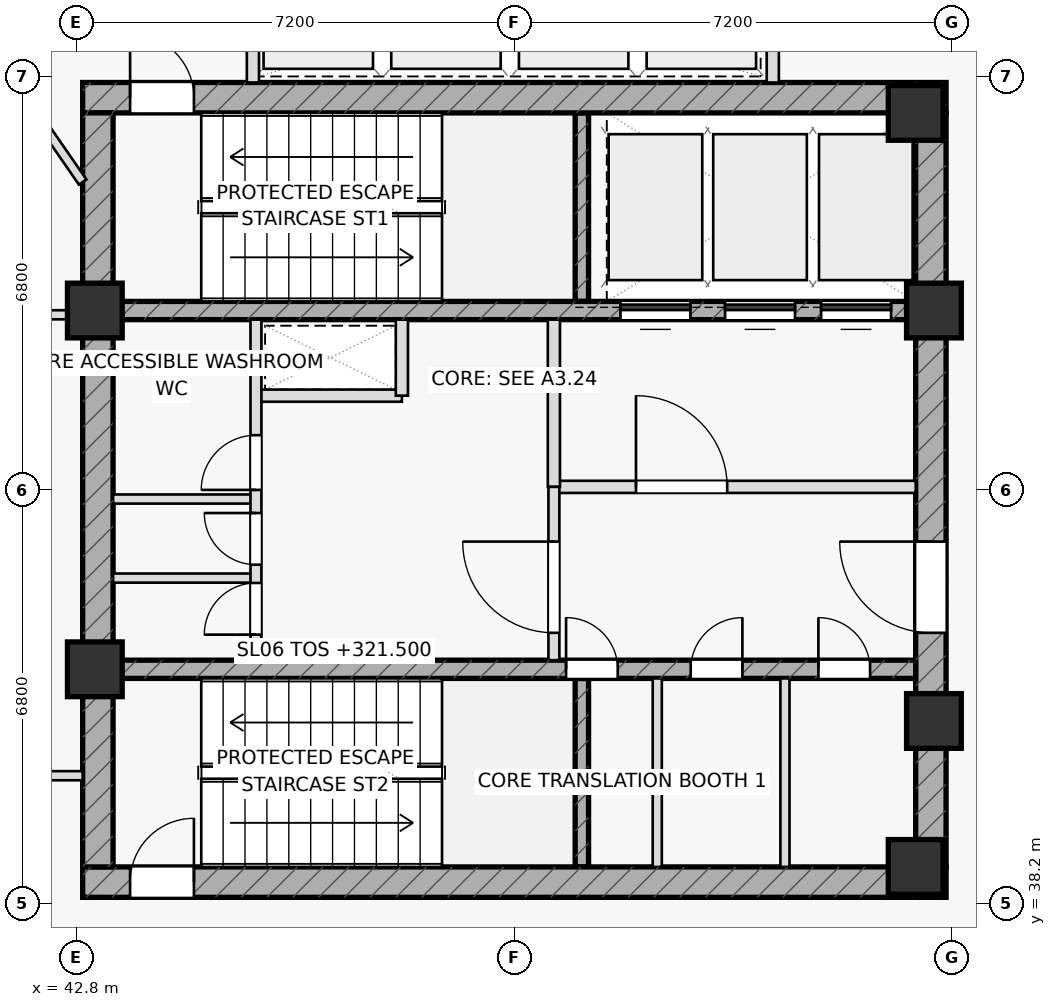
"""IFC4 building model, lengths in metres.
Left out: names, types, materials, properties, quantities, classifications, styles, units other than length and angle.
Written with IfcOpenShell. Run it as: python <this file> out.ifc"""

import sys

from ifc_helpers import new_model, si_unit, direction, frame, frame_2d, origin, origin_2d, place, context, subcontext, project, spatial, rectangle, extrude, element, fill, save


model = new_model("IFC4")
c1 = context("Model", 3, precision=1e-05, world=origin(), true_north=direction((0.0, 1.0)))
c2 = subcontext(c1, "Body", "Model", "MODEL_VIEW")
j1 = project(units=[si_unit("LENGTHUNIT", "METRE"), si_unit("PLANEANGLEUNIT", "RADIAN")], contexts=[c1])
p1 = place(None, origin())
s1 = spatial("IfcSite", under=j1, at=p1, CompositionType="ELEMENT")
p2 = place(p1, origin())
s2 = spatial("IfcBuilding", under=s1, at=p2, CompositionType="ELEMENT")
p3 = place(p2, frame((0.0, 0.0, 321.5)))
s3 = spatial("IfcBuildingStorey", under=s2, at=p3, CompositionType="ELEMENT", Elevation=321.5)
for number, where, z_axis, x_axis in (
    (1, (51.11, 48.1, 0.0), (0.0, 0.0, 1.0), (0.0, 1.0, 0.0)),
    (2, (51.11, 38.8, 0.0), (0.0, 0.0, 1.0), (0.0, 1.0, 0.0)),
):
    element("IfcWall", number, at=place(p3, frame(where, z_axis=z_axis, x_axis=x_axis)), inside=s3, PredefinedType="SHEAR", context=c2, shape_type="SweptSolid", body=[
        extrude(rectangle(XDim=3.1, YDim=0.22, at=frame_2d((1.55, 0.0))), origin(), (0.0, 0.0, 1.0), 3.55),
    ])
p4 = place(p3, frame((42.9, 51.45, 0.0), z_axis=(0.0, 0.0, 1.0), x_axis=(1.0, 0.0, 0.0)))
e3 = element("IfcWall", 3, at=p4, inside=s3, PredefinedType="SHEAR", context=c2, shape_type="SweptSolid", body=[
    extrude(rectangle(XDim=14.2, YDim=0.5, at=frame_2d((7.1, 0.0))), origin(), (0.0, 0.0, 1.0), 3.55),
])
p5 = place(p4, frame((0.78, 0.0, 0.0)))
e4 = element("IfcOpeningElement", 4, at=p5, cuts=e3, PredefinedType="OPENING", context=c2, shape_type="SweptSolid", body=[
    extrude(rectangle(XDim=1.05, YDim=2.2, at=frame_2d((0.525, 1.1))), frame((0.0, 0.26, 0.0), z_axis=(0.0, -1.0, 0.0), x_axis=(1.0, 0.0, 0.0)), (0.0, 0.0, 1.0), 0.52),
])
p6 = place(p3, frame((42.9, 38.55, 0.0), z_axis=(0.0, 0.0, 1.0), x_axis=(1.0, 0.0, 0.0)))
e5 = element("IfcWall", 5, at=p6, inside=s3, PredefinedType="SHEAR", context=c2, shape_type="SweptSolid", body=[
    extrude(rectangle(XDim=14.2, YDim=0.5, at=frame_2d((7.1, 0.0))), origin(), (0.0, 0.0, 1.0), 3.55),
])
p7 = place(p6, frame((0.78, 0.0, 0.0)))
e6 = element("IfcOpeningElement", 6, at=p7, cuts=e5, PredefinedType="OPENING", context=c2, shape_type="SweptSolid", body=[
    extrude(rectangle(XDim=1.05, YDim=2.2, at=frame_2d((0.525, 1.1))), frame((0.0, 0.26, 0.0), z_axis=(0.0, -1.0, 0.0), x_axis=(1.0, 0.0, 0.0)), (0.0, 0.0, 1.0), 0.52),
])
p8 = place(p3, frame((43.15, 38.8, 0.0), z_axis=(0.0, 0.0, 1.0), x_axis=(0.0, 1.0, 0.0)))
e7 = element("IfcWall", 7, at=p8, inside=s3, PredefinedType="SHEAR", context=c2, shape_type="SweptSolid", body=[
    extrude(rectangle(XDim=12.4, YDim=0.5, at=frame_2d((6.2, 0.0))), origin(), (0.0, 0.0, 1.0), 3.55),
])
p9 = place(p3, frame((56.85, 38.8, 0.0), z_axis=(0.0, 0.0, 1.0), x_axis=(0.0, 1.0, 0.0)))
e8 = element("IfcWall", 8, at=p9, inside=s3, PredefinedType="SHEAR", context=c2, shape_type="SweptSolid", body=[
    extrude(rectangle(XDim=12.4, YDim=0.5, at=frame_2d((6.2, 0.0))), origin(), (0.0, 0.0, 1.0), 3.55),
])
p10 = place(p9, frame((3.85, 0.0, 0.0)))
e9 = element("IfcOpeningElement", 9, at=p10, cuts=e8, PredefinedType="OPENING", context=c2, shape_type="SweptSolid", body=[
    extrude(rectangle(XDim=1.5, YDim=2.2, at=frame_2d((0.75, 1.1))), frame((0.0, 0.26, 0.0), z_axis=(0.0, -1.0, 0.0), x_axis=(1.0, 0.0, 0.0)), (0.0, 0.0, 1.0), 0.52),
])
p11 = place(p3, frame((43.4, 47.95, 0.0), z_axis=(0.0, 0.0, 1.0), x_axis=(1.0, 0.0, 0.0)))
e10 = element("IfcWall", 10, at=p11, inside=s3, PredefinedType="SHEAR", context=c2, shape_type="SweptSolid", body=[
    extrude(rectangle(XDim=13.2, YDim=0.3, at=frame_2d((6.6, 0.0))), origin(), (0.0, 0.0, 1.0), 3.55),
])
p12 = place(p11, frame((8.345, 0.0, 0.0)))
e11 = element("IfcOpeningElement", 11, at=p12, cuts=e10, PredefinedType="OPENING", context=c2, shape_type="SweptSolid", body=[
    extrude(rectangle(XDim=1.15, YDim=2.2, at=frame_2d((0.575, 1.1))), frame((0.0, 0.16, 0.0), z_axis=(0.0, -1.0, 0.0), x_axis=(1.0, 0.0, 0.0)), (0.0, 0.0, 1.0), 0.32),
])
p13 = place(p11, frame((10.065, 0.0, 0.0)))
e12 = element("IfcOpeningElement", 12, at=p13, cuts=e10, PredefinedType="OPENING", context=c2, shape_type="SweptSolid", body=[
    extrude(rectangle(XDim=1.15, YDim=2.2, at=frame_2d((0.575, 1.1))), frame((0.0, 0.16, 0.0), z_axis=(0.0, -1.0, 0.0), x_axis=(1.0, 0.0, 0.0)), (0.0, 0.0, 1.0), 0.32),
])
p14 = place(p11, frame((11.645, 0.0, 0.0)))
e13 = element("IfcOpeningElement", 13, at=p14, cuts=e10, PredefinedType="OPENING", context=c2, shape_type="SweptSolid", body=[
    extrude(rectangle(XDim=1.15, YDim=2.2, at=frame_2d((0.575, 1.1))), frame((0.0, 0.16, 0.0), z_axis=(0.0, -1.0, 0.0), x_axis=(1.0, 0.0, 0.0)), (0.0, 0.0, 1.0), 0.32),
])
p15 = place(p3, frame((43.4, 42.05, 0.0), z_axis=(0.0, 0.0, 1.0), x_axis=(1.0, 0.0, 0.0)))
e14 = element("IfcWall", 14, at=p15, inside=s3, PredefinedType="SHEAR", context=c2, shape_type="SweptSolid", body=[
    extrude(rectangle(XDim=13.2, YDim=0.3, at=frame_2d((6.6, 0.0))), origin(), (0.0, 0.0, 1.0), 3.55),
])
p16 = place(p15, frame((7.45, 0.0, 0.0)))
e15 = element("IfcOpeningElement", 15, at=p16, cuts=e14, PredefinedType="OPENING", context=c2, shape_type="SweptSolid", body=[
    extrude(rectangle(XDim=0.85, YDim=2.05, at=frame_2d((0.425, 1.025))), frame((0.0, 0.16, 0.0), z_axis=(0.0, -1.0, 0.0), x_axis=(1.0, 0.0, 0.0)), (0.0, 0.0, 1.0), 0.32),
])
p17 = place(p15, frame((9.5, 0.0, 0.0)))
e16 = element("IfcOpeningElement", 16, at=p17, cuts=e14, PredefinedType="OPENING", context=c2, shape_type="SweptSolid", body=[
    extrude(rectangle(XDim=0.85, YDim=2.05, at=frame_2d((0.425, 1.025))), frame((0.0, 0.16, 0.0), z_axis=(0.0, -1.0, 0.0), x_axis=(1.0, 0.0, 0.0)), (0.0, 0.0, 1.0), 0.32),
])
p18 = place(p15, frame((11.6, 0.0, 0.0)))
e17 = element("IfcOpeningElement", 17, at=p18, cuts=e14, PredefinedType="OPENING", context=c2, shape_type="SweptSolid", body=[
    extrude(rectangle(XDim=0.85, YDim=2.05, at=frame_2d((0.425, 1.025))), frame((0.0, 0.16, 0.0), z_axis=(0.0, -1.0, 0.0), x_axis=(1.0, 0.0, 0.0)), (0.0, 0.0, 1.0), 0.32),
])
for number, where, z_axis, x_axis in (
    (18, (43.1, 47.95, 0.0), (0.0, 0.0, 1.0), (1.0, 0.0, 0.0)),
    (19, (56.9, 47.95, 0.0), (0.0, 0.0, 1.0), (1.0, 0.0, 0.0)),
    (20, (56.6, 51.2, 0.0), (0.0, 0.0, 1.0), (1.0, 0.0, 0.0)),
    (21, (43.1, 42.05, 0.0), (0.0, 0.0, 1.0), (1.0, 0.0, 0.0)),
    (22, (56.9, 41.2, 0.0), (0.0, 0.0, 1.0), (1.0, 0.0, 0.0)),
    (23, (56.6, 38.8, 0.0), (0.0, 0.0, 1.0), (1.0, 0.0, 0.0)),
):
    element("IfcColumn", number, at=place(p3, frame(where, z_axis=z_axis, x_axis=x_axis)), inside=s3, PredefinedType="COLUMN", context=c2, shape_type="SweptSolid", body=[
        extrude(rectangle(XDim=0.9, YDim=0.9, at=origin_2d()), origin(), (0.0, 0.0, 1.0), 3.55),
    ])
for number, where, z_axis, x_axis in (
    (24, (45.7, 51.7, 0.0), (0.0, 0.0, 1.0), (0.0, 1.0, 0.0)),
    (25, (54.25, 51.7, 0.0), (0.0, 0.0, 1.0), (0.0, 1.0, 0.0)),
):
    element("IfcWall", number, at=place(p3, frame(where, z_axis=z_axis, x_axis=x_axis)), inside=s3, PredefinedType="PARTITIONING", context=c2, shape_type="SweptSolid", body=[
        extrude(rectangle(XDim=2.6, YDim=0.2, at=frame_2d((1.3, 0.0))), origin(), (0.0, 0.0, 1.0), 3.55),
    ])
p19 = place(p3, frame((45.75, 46.55, 0.0), z_axis=(0.0, 0.0, 1.0), x_axis=(1.0, 0.0, 0.0)))
e26 = element("IfcWall", 26, at=p19, inside=s3, PredefinedType="PARTITIONING", context=c2, shape_type="SweptSolid", body=[
    extrude(rectangle(XDim=2.4, YDim=0.2, at=frame_2d((1.2, 0.0))), origin(), (0.0, 0.0, 1.0), 3.55),
])
p20 = place(p3, frame((48.15, 46.55, 0.0), z_axis=(0.0, 0.0, 1.0), x_axis=(0.0, 1.0, 0.0)))
e27 = element("IfcWall", 27, at=p20, inside=s3, PredefinedType="PARTITIONING", context=c2, shape_type="SweptSolid", body=[
    extrude(rectangle(XDim=1.25, YDim=0.2, at=frame_2d((0.625, 0.0))), origin(), (0.0, 0.0, 1.0), 3.55),
])
p21 = place(p3, frame((50.65, 45.05, 0.0), z_axis=(0.0, 0.0, 1.0), x_axis=(1.0, 0.0, 0.0)))
e28 = element("IfcWall", 28, at=p21, inside=s3, PredefinedType="PARTITIONING", context=c2, shape_type="SweptSolid", body=[
    extrude(rectangle(XDim=5.95, YDim=0.2, at=frame_2d((2.975, 0.0))), origin(), (0.0, 0.0, 1.0), 3.55),
])
p22 = place(p21, frame((1.35, 0.0, 0.0)))
e29 = element("IfcOpeningElement", 29, at=p22, cuts=e28, PredefinedType="OPENING", context=c2, shape_type="SweptSolid", body=[
    extrude(rectangle(XDim=1.5, YDim=2.2, at=frame_2d((0.75, 1.1))), frame((0.0, 0.11, 0.0), z_axis=(0.0, -1.0, 0.0), x_axis=(1.0, 0.0, 0.0)), (0.0, 0.0, 1.0), 0.22),
])
p23 = place(p3, frame((50.65, 45.05, 0.0), z_axis=(0.0, 0.0, 1.0), x_axis=(0.0, 1.0, 0.0)))
e30 = element("IfcWall", 30, at=p23, inside=s3, PredefinedType="PARTITIONING", context=c2, shape_type="SweptSolid", body=[
    extrude(rectangle(XDim=2.75, YDim=0.2, at=frame_2d((1.375, 0.0))), origin(), (0.0, 0.0, 1.0), 3.55),
])
p24 = place(p3, frame((50.65, 42.2, 0.0), z_axis=(0.0, 0.0, 1.0), x_axis=(0.0, 1.0, 0.0)))
e31 = element("IfcWall", 31, at=p24, inside=s3, PredefinedType="PARTITIONING", context=c2, shape_type="SweptSolid", body=[
    extrude(rectangle(XDim=2.85, YDim=0.18, at=frame_2d((1.425, 0.0))), origin(), (0.0, 0.0, 1.0), 3.55),
])
p25 = place(p24, frame((0.45, 0.0, 0.0)))
e32 = element("IfcOpeningElement", 32, at=p25, cuts=e31, PredefinedType="OPENING", context=c2, shape_type="SweptSolid", body=[
    extrude(rectangle(XDim=1.5, YDim=2.2, at=frame_2d((0.75, 1.1))), frame((0.0, 0.1, 0.0), z_axis=(0.0, -1.0, 0.0), x_axis=(1.0, 0.0, 0.0)), (0.0, 0.0, 1.0), 0.2),
])
for number, where, z_axis, x_axis in (
    (33, (52.35, 38.8, 0.0), (0.0, 0.0, 1.0), (0.0, 1.0, 0.0)),
    (34, (54.45, 38.8, 0.0), (0.0, 0.0, 1.0), (0.0, 1.0, 0.0)),
):
    element("IfcWall", number, at=place(p3, frame(where, z_axis=z_axis, x_axis=x_axis)), inside=s3, PredefinedType="PARTITIONING", context=c2, shape_type="SweptSolid", body=[
        extrude(rectangle(XDim=3.1, YDim=0.15, at=frame_2d((1.55, 0.0))), origin(), (0.0, 0.0, 1.0), 3.55),
    ])
for number, where, z_axis, x_axis in (
    (35, (43.4, 43.55, 0.0), (0.0, 0.0, 1.0), (1.0, 0.0, 0.0)),
    (36, (43.4, 44.85, 0.0), (0.0, 0.0, 1.0), (1.0, 0.0, 0.0)),
):
    element("IfcWall", number, at=place(p3, frame(where, z_axis=z_axis, x_axis=x_axis)), inside=s3, PredefinedType="PARTITIONING", context=c2, shape_type="SweptSolid", body=[
        extrude(rectangle(XDim=2.35, YDim=0.15, at=frame_2d((1.175, 0.0))), origin(), (0.0, 0.0, 1.0), 3.55),
    ])
p26 = place(p3, frame((45.75, 42.2, 0.0), z_axis=(0.0, 0.0, 1.0), x_axis=(0.0, 1.0, 0.0)))
e37 = element("IfcWall", 37, at=p26, inside=s3, PredefinedType="PARTITIONING", context=c2, shape_type="SweptSolid", body=[
    extrude(rectangle(XDim=5.6, YDim=0.18, at=frame_2d((2.8, 0.0))), origin(), (0.0, 0.0, 1.0), 3.55),
])
p27 = place(p26, frame((0.42, 0.0, 0.0)))
e38 = element("IfcOpeningElement", 38, at=p27, cuts=e37, PredefinedType="OPENING", context=c2, shape_type="SweptSolid", body=[
    extrude(rectangle(XDim=0.85, YDim=2.05, at=frame_2d((0.425, 1.025))), frame((0.0, 0.1, 0.0), z_axis=(0.0, -1.0, 0.0), x_axis=(1.0, 0.0, 0.0)), (0.0, 0.0, 1.0), 0.2),
])
p28 = place(p26, frame((1.57, 0.0, 0.0)))
e39 = element("IfcOpeningElement", 39, at=p28, cuts=e37, PredefinedType="OPENING", context=c2, shape_type="SweptSolid", body=[
    extrude(rectangle(XDim=0.85, YDim=2.05, at=frame_2d((0.425, 1.025))), frame((0.0, 0.1, 0.0), z_axis=(0.0, -1.0, 0.0), x_axis=(1.0, 0.0, 0.0)), (0.0, 0.0, 1.0), 0.2),
])
p29 = place(p26, frame((2.8, 0.0, 0.0)))
e40 = element("IfcOpeningElement", 40, at=p29, cuts=e37, PredefinedType="OPENING", context=c2, shape_type="SweptSolid", body=[
    extrude(rectangle(XDim=0.9, YDim=2.05, at=frame_2d((0.45, 1.025))), frame((0.0, 0.1, 0.0), z_axis=(0.0, -1.0, 0.0), x_axis=(1.0, 0.0, 0.0)), (0.0, 0.0, 1.0), 0.2),
])
p30 = place(p3, frame((37.14, 40.3, 0.0), z_axis=(0.0, 0.0, 1.0), x_axis=(1.0, 0.0, 0.0)))
e41 = element("IfcWall", 41, at=p30, inside=s3, PredefinedType="PARTITIONING", context=c2, shape_type="SweptSolid", body=[
    extrude(rectangle(XDim=5.76, YDim=0.15, at=frame_2d((2.88, 0.0))), origin(), (0.0, 0.0, 1.0), 3.075),
])
p31 = place(p30, frame((3.21, 0.0, 0.0)))
e42 = element("IfcOpeningElement", 42, at=p31, cuts=e41, PredefinedType="OPENING", context=c2, shape_type="SweptSolid", body=[
    extrude(rectangle(XDim=0.95, YDim=2.05, at=frame_2d((0.475, 1.025))), frame((0.0, 0.085, 0.0), z_axis=(0.0, -1.0, 0.0), x_axis=(1.0, 0.0, 0.0)), (0.0, 0.0, 1.0), 0.17),
])
p32 = place(p3, frame((37.14, 47.88, 0.0), z_axis=(0.0, 0.0, 1.0), x_axis=(1.0, 0.0, 0.0)))
e43 = element("IfcWall", 43, at=p32, inside=s3, PredefinedType="PARTITIONING", context=c2, shape_type="SweptSolid", body=[
    extrude(rectangle(XDim=5.76, YDim=0.15, at=frame_2d((2.88, 0.0))), origin(), (0.0, 0.0, 1.0), 3.55),
])
p33 = place(p3, frame((42.9, 50.062, 0.0), z_axis=(0.0, 0.0, 1.0), x_axis=(-0.568663071572, 0.822570550792, 0.0)))
e44 = element("IfcWall", 44, at=p33, inside=s3, PredefinedType="PARTITIONING", context=c2, shape_type="SweptSolid", body=[
    extrude(rectangle(XDim=14.047, YDim=0.15, at=frame_2d((7.023, 0.0))), origin(), (0.0, 0.0, 1.0), 3.075),
])
p34 = place(p33, frame((1.35, 0.0, 0.0)))
e45 = element("IfcOpeningElement", 45, at=p34, cuts=e44, PredefinedType="OPENING", context=c2, shape_type="SweptSolid", body=[
    extrude(rectangle(XDim=0.95, YDim=2.05, at=frame_2d((0.475, 1.025))), frame((0.0, 0.085, 0.0), z_axis=(0.0, -1.0, 0.0), x_axis=(1.0, 0.0, 0.0)), (0.0, 0.0, 1.0), 0.17),
])
p35 = place(p5, origin())
e46 = element("IfcDoor", 46, at=p35, inside=s3, OperationType="SINGLE_SWING_LEFT", PredefinedType="DOOR", context=c2, shape_type="SweptSolid", body=[
    extrude(rectangle(XDim=1.05, YDim=2.2, at=frame_2d((0.525, 1.1))), frame((0.0, 0.025, 0.0), z_axis=(0.0, -1.0, 0.0), x_axis=(1.0, 0.0, 0.0)), (0.0, 0.0, 1.0), 0.05),
])
fill(e4, e46)
p36 = place(p7, origin())
e47 = element("IfcDoor", 47, at=p36, inside=s3, OperationType="SINGLE_SWING_RIGHT", PredefinedType="DOOR", context=c2, shape_type="SweptSolid", body=[
    extrude(rectangle(XDim=1.05, YDim=2.2, at=frame_2d((0.525, 1.1))), frame((0.0, 0.025, 0.0), z_axis=(0.0, -1.0, 0.0), x_axis=(1.0, 0.0, 0.0)), (0.0, 0.0, 1.0), 0.05),
])
fill(e6, e47)
p37 = place(p10, origin())
e48 = element("IfcDoor", 48, at=p37, inside=s3, OperationType="SINGLE_SWING_RIGHT", PredefinedType="DOOR", context=c2, shape_type="SweptSolid", body=[
    extrude(rectangle(XDim=1.5, YDim=2.2, at=frame_2d((0.75, 1.1))), frame((0.0, 0.025, 0.0), z_axis=(0.0, -1.0, 0.0), x_axis=(1.0, 0.0, 0.0)), (0.0, 0.0, 1.0), 0.05),
])
fill(e9, e48)
p38 = place(p22, origin())
e49 = element("IfcDoor", 49, at=p38, inside=s3, OperationType="SINGLE_SWING_LEFT", PredefinedType="DOOR", context=c2, shape_type="SweptSolid", body=[
    extrude(rectangle(XDim=1.5, YDim=2.2, at=frame_2d((0.75, 1.1))), frame((0.0, 0.025, 0.0), z_axis=(0.0, -1.0, 0.0), x_axis=(1.0, 0.0, 0.0)), (0.0, 0.0, 1.0), 0.05),
])
fill(e29, e49)
p39 = place(p25, origin())
e50 = element("IfcDoor", 50, at=p39, inside=s3, OperationType="SINGLE_SWING_RIGHT", PredefinedType="DOOR", context=c2, shape_type="SweptSolid", body=[
    extrude(rectangle(XDim=1.5, YDim=2.2, at=frame_2d((0.75, 1.1))), frame((0.0, 0.025, 0.0), z_axis=(0.0, -1.0, 0.0), x_axis=(1.0, 0.0, 0.0)), (0.0, 0.0, 1.0), 0.05),
])
fill(e32, e50)
p40 = place(p16, origin())
e51 = element("IfcDoor", 51, at=p40, inside=s3, OperationType="SINGLE_SWING_LEFT", PredefinedType="DOOR", context=c2, shape_type="SweptSolid", body=[
    extrude(rectangle(XDim=0.85, YDim=2.05, at=frame_2d((0.425, 1.025))), frame((0.0, 0.025, 0.0), z_axis=(0.0, -1.0, 0.0), x_axis=(1.0, 0.0, 0.0)), (0.0, 0.0, 1.0), 0.05),
])
fill(e15, e51)
p41 = place(p17, origin())
e52 = element("IfcDoor", 52, at=p41, inside=s3, OperationType="SINGLE_SWING_RIGHT", PredefinedType="DOOR", context=c2, shape_type="SweptSolid", body=[
    extrude(rectangle(XDim=0.85, YDim=2.05, at=frame_2d((0.425, 1.025))), frame((0.0, 0.025, 0.0), z_axis=(0.0, -1.0, 0.0), x_axis=(1.0, 0.0, 0.0)), (0.0, 0.0, 1.0), 0.05),
])
fill(e16, e52)
p42 = place(p18, origin())
e53 = element("IfcDoor", 53, at=p42, inside=s3, OperationType="SINGLE_SWING_LEFT", PredefinedType="DOOR", context=c2, shape_type="SweptSolid", body=[
    extrude(rectangle(XDim=0.85, YDim=2.05, at=frame_2d((0.425, 1.025))), frame((0.0, 0.025, 0.0), z_axis=(0.0, -1.0, 0.0), x_axis=(1.0, 0.0, 0.0)), (0.0, 0.0, 1.0), 0.05),
])
fill(e17, e53)
p43 = place(p27, origin())
e54 = element("IfcDoor", 54, at=p43, inside=s3, OperationType="SINGLE_SWING_LEFT", PredefinedType="DOOR", context=c2, shape_type="SweptSolid", body=[
    extrude(rectangle(XDim=0.85, YDim=2.05, at=frame_2d((0.425, 1.025))), frame((0.0, 0.025, 0.0), z_axis=(0.0, -1.0, 0.0), x_axis=(1.0, 0.0, 0.0)), (0.0, 0.0, 1.0), 0.05),
])
fill(e38, e54)
p44 = place(p28, origin())
e55 = element("IfcDoor", 55, at=p44, inside=s3, OperationType="SINGLE_SWING_RIGHT", PredefinedType="DOOR", context=c2, shape_type="SweptSolid", body=[
    extrude(rectangle(XDim=0.85, YDim=2.05, at=frame_2d((0.425, 1.025))), frame((0.0, 0.025, 0.0), z_axis=(0.0, -1.0, 0.0), x_axis=(1.0, 0.0, 0.0)), (0.0, 0.0, 1.0), 0.05),
])
fill(e39, e55)
p45 = place(p29, origin())
e56 = element("IfcDoor", 56, at=p45, inside=s3, OperationType="SINGLE_SWING_LEFT", PredefinedType="DOOR", context=c2, shape_type="SweptSolid", body=[
    extrude(rectangle(XDim=0.9, YDim=2.05, at=frame_2d((0.45, 1.025))), frame((0.0, 0.025, 0.0), z_axis=(0.0, -1.0, 0.0), x_axis=(1.0, 0.0, 0.0)), (0.0, 0.0, 1.0), 0.05),
])
fill(e40, e56)
p46 = place(p12, origin())
e57 = element("IfcDoor", 57, at=p46, inside=s3, OperationType="SLIDING_TO_LEFT", PredefinedType="DOOR", context=c2, shape_type="SweptSolid", body=[
    extrude(rectangle(XDim=1.15, YDim=2.2, at=frame_2d((0.575, 1.1))), frame((0.0, 0.025, 0.0), z_axis=(0.0, -1.0, 0.0), x_axis=(1.0, 0.0, 0.0)), (0.0, 0.0, 1.0), 0.05),
])
fill(e11, e57)
p47 = place(p13, origin())
e58 = element("IfcDoor", 58, at=p47, inside=s3, OperationType="SLIDING_TO_LEFT", PredefinedType="DOOR", context=c2, shape_type="SweptSolid", body=[
    extrude(rectangle(XDim=1.15, YDim=2.2, at=frame_2d((0.575, 1.1))), frame((0.0, 0.025, 0.0), z_axis=(0.0, -1.0, 0.0), x_axis=(1.0, 0.0, 0.0)), (0.0, 0.0, 1.0), 0.05),
])
fill(e12, e58)
p48 = place(p14, origin())
e59 = element("IfcDoor", 59, at=p48, inside=s3, OperationType="SLIDING_TO_LEFT", PredefinedType="DOOR", context=c2, shape_type="SweptSolid", body=[
    extrude(rectangle(XDim=1.15, YDim=2.2, at=frame_2d((0.575, 1.1))), frame((0.0, 0.025, 0.0), z_axis=(0.0, -1.0, 0.0), x_axis=(1.0, 0.0, 0.0)), (0.0, 0.0, 1.0), 0.05),
])
fill(e13, e59)
save(model, sys.argv[1])
